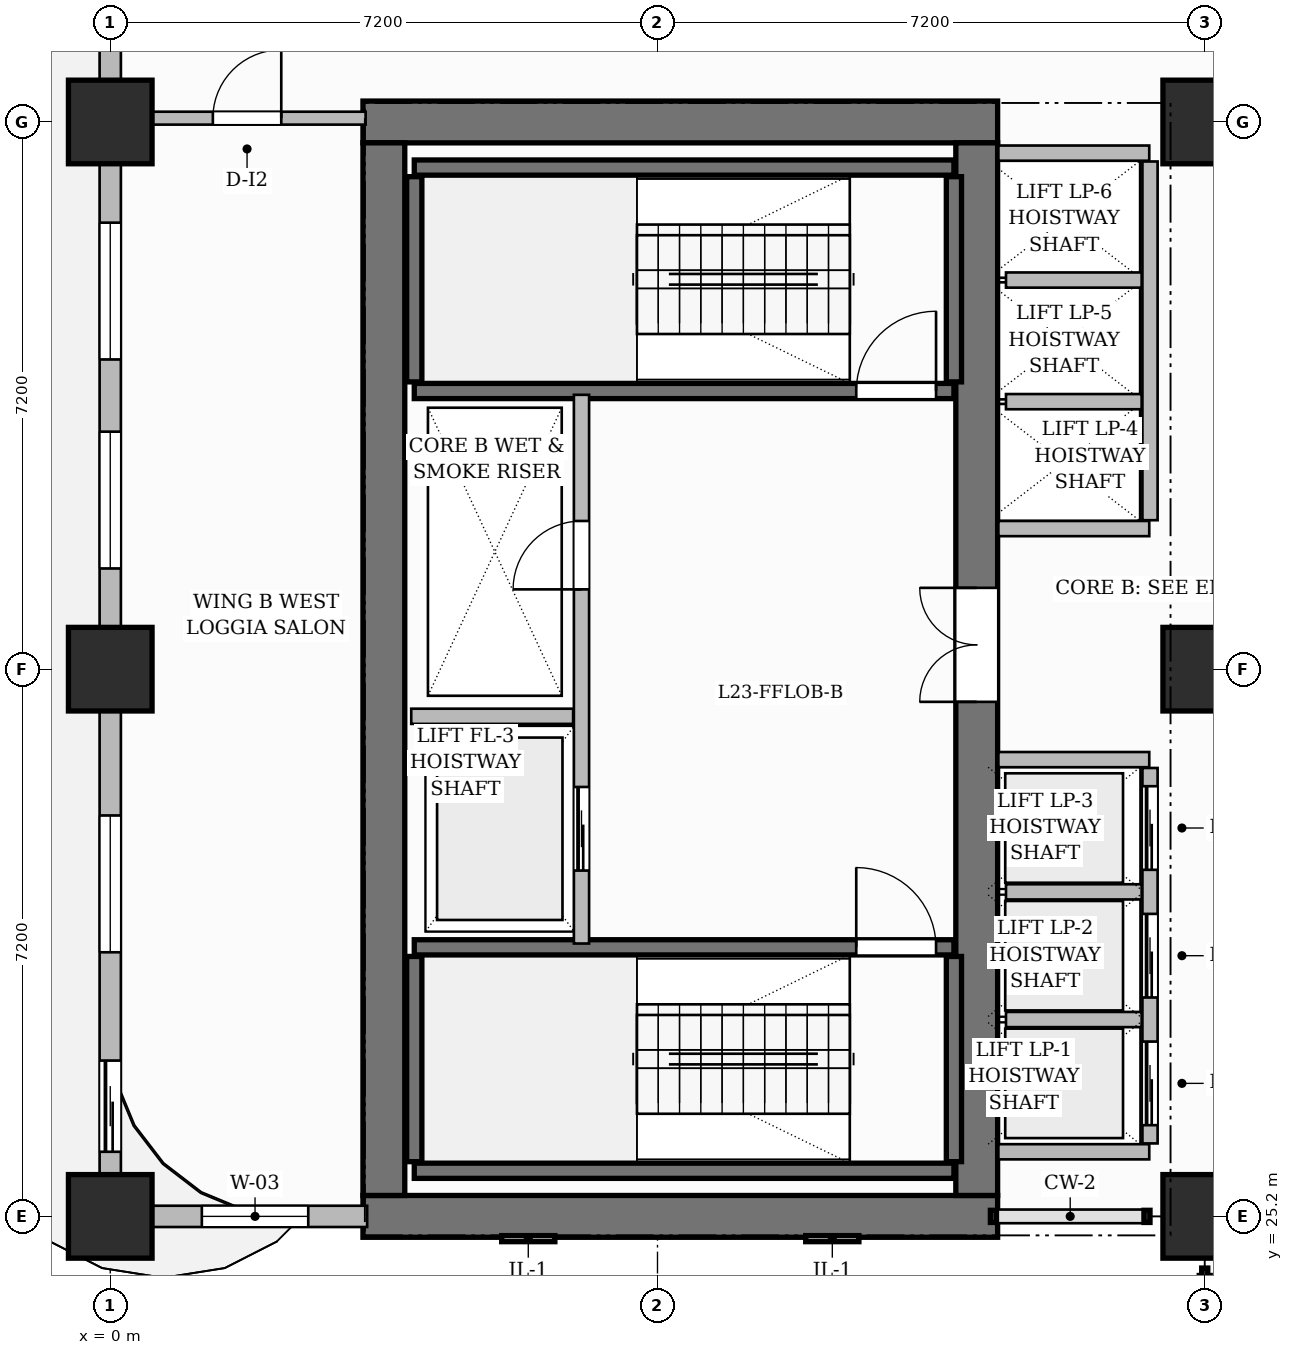
"""IFC4 building model, lengths in metres.
Left out: names, types, materials, properties, quantities, classifications, styles, units other than length and angle.
Written with IfcOpenShell. Run it as: python <this file> out.ifc"""

import sys

from ifc_helpers import new_model, si_unit, direction, frame, frame_2d, origin, origin_2d, place, context, subcontext, project, spatial, rectangle, extrude, source, transform, mapped, element, fill, save


model = new_model("IFC4")
c1 = context("Model", 3, precision=1e-05, world=origin(), true_north=direction((0.0, 1.0)))
c2 = subcontext(c1, "Body", "Model", "MODEL_VIEW")
j1 = project(units=[si_unit("LENGTHUNIT", "METRE"), si_unit("PLANEANGLEUNIT", "RADIAN")], contexts=[c1])
p1 = place(None, origin())
s1 = spatial("IfcSite", under=j1, at=p1, CompositionType="ELEMENT")
p2 = place(p1, origin())
s2 = spatial("IfcBuilding", under=s1, at=p2, CompositionType="ELEMENT")
p3 = place(p2, frame((0.0, 0.0, 95.3)))
s3 = spatial("IfcBuildingStorey", under=s2, at=p3, CompositionType="ELEMENT", Elevation=95.3)
for number, where, z_axis, x_axis in (
    (1, (3.325, 25.2, 0.0), (0.0, 0.0, 1.0), (1.0, 0.0, 0.0)),
    (2, (3.325, 39.6, 0.0), (0.0, 0.0, 1.0), (1.0, 0.0, 0.0)),
):
    element("IfcWall", number, at=place(p3, frame(where, z_axis=z_axis, x_axis=x_axis)), inside=s3, PredefinedType="SHEAR", context=c2, shape_type="SweptSolid", body=[
        extrude(rectangle(XDim=8.35, YDim=0.55, at=frame_2d((4.175, 0.0))), origin(), (0.0, 0.0, 1.0), 3.7),
    ])
p4 = place(p3, frame((3.6, 25.475, 0.0), z_axis=(0.0, 0.0, 1.0), x_axis=(0.0, 1.0, 0.0)))
e3 = element("IfcWall", 3, at=p4, inside=s3, PredefinedType="SHEAR", context=c2, shape_type="SweptSolid", body=[
    extrude(rectangle(XDim=13.85, YDim=0.55, at=frame_2d((6.925, 0.0))), origin(), (0.0, 0.0, 1.0), 3.7),
])
p5 = place(p3, frame((11.4, 25.475, 0.0), z_axis=(0.0, 0.0, 1.0), x_axis=(0.0, 1.0, 0.0)))
e4 = element("IfcWall", 4, at=p5, inside=s3, PredefinedType="SHEAR", context=c2, shape_type="SweptSolid", body=[
    extrude(rectangle(XDim=13.85, YDim=0.55, at=frame_2d((6.925, 0.0))), origin(), (0.0, 0.0, 1.0), 3.7),
])
p6 = place(p5, frame((6.495, 0.0, 0.0)))
e5 = element("IfcOpeningElement", 5, at=p6, cuts=e4, PredefinedType="OPENING", context=c2, shape_type="SweptSolid", body=[
    extrude(rectangle(XDim=1.5, YDim=2.2, at=frame_2d((0.75, 1.1))), frame((0.0, 0.285, 0.0), z_axis=(0.0, -1.0, 0.0), x_axis=(1.0, 0.0, 0.0)), (0.0, 0.0, 1.0), 0.57),
])
m1 = source(origin(), c2, "Body", "SweptSolid", [
    extrude(rectangle(XDim=1.1, YDim=1.1, at=origin_2d()), origin(), (0.0, 0.0, 1.0), 3.7),
])
for number, where, z_axis, x_axis in (
    (6, (0.0, 25.2, 0.0), (0.0, 0.0, 1.0), (1.0, 0.0, 0.0)),
    (7, (0.0, 32.4, 0.0), (0.0, 0.0, 1.0), (1.0, 0.0, 0.0)),
    (8, (0.0, 39.6, 0.0), (0.0, 0.0, 1.0), (1.0, 0.0, 0.0)),
    (9, (14.4, 25.2, 0.0), (0.0, 0.0, 1.0), (1.0, 0.0, 0.0)),
    (10, (14.4, 32.4, 0.0), (0.0, 0.0, 1.0), (1.0, 0.0, 0.0)),
    (11, (14.4, 39.6, 0.0), (0.0, 0.0, 1.0), (1.0, 0.0, 0.0)),
):
    element("IfcColumn", number, at=place(p3, frame(where, z_axis=z_axis, x_axis=x_axis)), inside=s3, PredefinedType="COLUMN", context=c2, shape_type="MappedRepresentation", body=[
        mapped(m1, transform((0.0, 0.0, 0.0), scale=1.0)),
    ])
p7 = place(p3, frame((4.0, 25.8, 0.0), z_axis=(0.0, 0.0, 1.0), x_axis=(1.0, 0.0, 0.0)))
e12 = element("IfcWall", 12, at=p7, inside=s3, PredefinedType="SHEAR", context=c2, shape_type="SweptSolid", body=[
    extrude(rectangle(XDim=7.1, YDim=0.2, at=frame_2d((3.55, 0.0))), origin(), (0.0, 0.0, 1.0), 3.7),
])
for number, where, z_axis, x_axis in (
    (13, (4.0, 25.92, 0.0), (0.0, 0.0, 1.0), (0.0, 1.0, 0.0)),
    (14, (11.1, 25.92, 0.0), (0.0, 0.0, 1.0), (0.0, 1.0, 0.0)),
):
    element("IfcWall", number, at=place(p3, frame(where, z_axis=z_axis, x_axis=x_axis)), inside=s3, PredefinedType="SHEAR", context=c2, shape_type="SweptSolid", body=[
        extrude(rectangle(XDim=2.7, YDim=0.2, at=frame_2d((1.35, 0.0))), origin(), (0.0, 0.0, 1.0), 3.7),
    ])
p8 = place(p3, frame((4.0, 28.74, 0.0), z_axis=(0.0, 0.0, 1.0), x_axis=(1.0, 0.0, 0.0)))
e15 = element("IfcWall", 15, at=p8, inside=s3, PredefinedType="SHEAR", context=c2, shape_type="SweptSolid", body=[
    extrude(rectangle(XDim=7.1, YDim=0.2, at=frame_2d((3.55, 0.0))), origin(), (0.0, 0.0, 1.0), 3.7),
])
p9 = place(p8, frame((5.815, 0.0, 0.0)))
e16 = element("IfcOpeningElement", 16, at=p9, cuts=e15, PredefinedType="OPENING", context=c2, shape_type="SweptSolid", body=[
    extrude(rectangle(XDim=1.05, YDim=2.2, at=frame_2d((0.525, 1.1))), frame((0.0, 0.11, 0.0), z_axis=(0.0, -1.0, 0.0), x_axis=(1.0, 0.0, 0.0)), (0.0, 0.0, 1.0), 0.22),
])
p10 = place(p3, frame((4.0, 39.0, 0.0), z_axis=(0.0, 0.0, 1.0), x_axis=(1.0, 0.0, 0.0)))
e17 = element("IfcWall", 17, at=p10, inside=s3, PredefinedType="SHEAR", context=c2, shape_type="SweptSolid", body=[
    extrude(rectangle(XDim=7.1, YDim=0.2, at=frame_2d((3.55, 0.0))), origin(), (0.0, 0.0, 1.0), 3.7),
])
for number, where, z_axis, x_axis in (
    (18, (4.0, 36.18, 0.0), (0.0, 0.0, 1.0), (0.0, 1.0, 0.0)),
    (19, (11.1, 36.18, 0.0), (0.0, 0.0, 1.0), (0.0, 1.0, 0.0)),
):
    element("IfcWall", number, at=place(p3, frame(where, z_axis=z_axis, x_axis=x_axis)), inside=s3, PredefinedType="SHEAR", context=c2, shape_type="SweptSolid", body=[
        extrude(rectangle(XDim=2.7, YDim=0.2, at=frame_2d((1.35, 0.0))), origin(), (0.0, 0.0, 1.0), 3.7),
    ])
p11 = place(p3, frame((4.0, 36.06, 0.0), z_axis=(0.0, 0.0, 1.0), x_axis=(1.0, 0.0, 0.0)))
e20 = element("IfcWall", 20, at=p11, inside=s3, PredefinedType="SHEAR", context=c2, shape_type="SweptSolid", body=[
    extrude(rectangle(XDim=7.1, YDim=0.2, at=frame_2d((3.55, 0.0))), origin(), (0.0, 0.0, 1.0), 3.7),
])
p12 = place(p11, frame((5.815, 0.0, 0.0)))
e21 = element("IfcOpeningElement", 21, at=p12, cuts=e20, PredefinedType="OPENING", context=c2, shape_type="SweptSolid", body=[
    extrude(rectangle(XDim=1.05, YDim=2.2, at=frame_2d((0.525, 1.1))), frame((0.0, 0.11, 0.0), z_axis=(0.0, -1.0, 0.0), x_axis=(1.0, 0.0, 0.0)), (0.0, 0.0, 1.0), 0.22),
])
p13 = place(p3, frame((6.2, 28.79, 0.0), z_axis=(0.0, 0.0, 1.0), x_axis=(0.0, 1.0, 0.0)))
e22 = element("IfcWall", 22, at=p13, inside=s3, PredefinedType="PARTITIONING", context=c2, shape_type="SweptSolid", body=[
    extrude(rectangle(XDim=7.22, YDim=0.2, at=frame_2d((3.61, 0.0))), origin(), (0.0, 0.0, 1.0), 3.45),
])
p14 = place(p13, frame((4.66, 0.0, 0.0)))
e23 = element("IfcOpeningElement", 23, at=p14, cuts=e22, PredefinedType="OPENING", context=c2, shape_type="SweptSolid", body=[
    extrude(rectangle(XDim=0.9, YDim=2.1, at=frame_2d((0.45, 1.05))), frame((0.0, 0.11, 0.0), z_axis=(0.0, -1.0, 0.0), x_axis=(1.0, 0.0, 0.0)), (0.0, 0.0, 1.0), 0.22),
])
p15 = place(p13, frame((0.96, 0.0, 0.0)))
e24 = element("IfcOpeningElement", 24, at=p15, cuts=e22, PredefinedType="OPENING", context=c2, shape_type="SweptSolid", body=[
    extrude(rectangle(XDim=1.1, YDim=2.2, at=frame_2d((0.55, 1.1))), frame((0.0, 0.11, 0.0), z_axis=(0.0, -1.0, 0.0), x_axis=(1.0, 0.0, 0.0)), (0.0, 0.0, 1.0), 0.22),
])
p16 = place(p3, frame((3.96, 31.78, 0.0), z_axis=(0.0, 0.0, 1.0), x_axis=(1.0, 0.0, 0.0)))
e25 = element("IfcWall", 25, at=p16, inside=s3, PredefinedType="PARTITIONING", context=c2, shape_type="SweptSolid", body=[
    extrude(rectangle(XDim=2.13, YDim=0.2, at=frame_2d((1.065, 0.0))), origin(), (0.0, 0.0, 1.0), 3.45),
])
for number, where, z_axis, x_axis in (
    (26, (11.685, 26.05, 0.0), (0.0, 0.0, 1.0), (1.0, 0.0, 0.0)),
    (27, (11.685, 31.21, 0.0), (0.0, 0.0, 1.0), (1.0, 0.0, 0.0)),
):
    element("IfcWall", number, at=place(p3, frame(where, z_axis=z_axis, x_axis=x_axis)), inside=s3, PredefinedType="PARTITIONING", context=c2, shape_type="SweptSolid", body=[
        extrude(rectangle(XDim=1.985, YDim=0.2, at=frame_2d((0.992, 0.0))), origin(), (0.0, 0.0, 1.0), 3.45),
    ])
p17 = place(p3, frame((13.68, 26.16, 0.0), z_axis=(0.0, 0.0, 1.0), x_axis=(0.0, 1.0, 0.0)))
e28 = element("IfcWall", 28, at=p17, inside=s3, PredefinedType="PARTITIONING", context=c2, shape_type="SweptSolid", body=[
    extrude(rectangle(XDim=4.94, YDim=0.2, at=frame_2d((2.47, 0.0))), origin(), (0.0, 0.0, 1.0), 3.45),
])
p18 = place(p17, frame((0.24, 0.0, 0.0)))
e29 = element("IfcOpeningElement", 29, at=p18, cuts=e28, PredefinedType="OPENING", context=c2, shape_type="SweptSolid", body=[
    extrude(rectangle(XDim=1.1, YDim=2.2, at=frame_2d((0.55, 1.1))), frame((0.0, 0.11, 0.0), z_axis=(0.0, -1.0, 0.0), x_axis=(1.0, 0.0, 0.0)), (0.0, 0.0, 1.0), 0.22),
])
p19 = place(p17, frame((1.92, 0.0, 0.0)))
e30 = element("IfcOpeningElement", 30, at=p19, cuts=e28, PredefinedType="OPENING", context=c2, shape_type="SweptSolid", body=[
    extrude(rectangle(XDim=1.1, YDim=2.2, at=frame_2d((0.55, 1.1))), frame((0.0, 0.11, 0.0), z_axis=(0.0, -1.0, 0.0), x_axis=(1.0, 0.0, 0.0)), (0.0, 0.0, 1.0), 0.22),
])
p20 = place(p17, frame((3.6, 0.0, 0.0)))
e31 = element("IfcOpeningElement", 31, at=p20, cuts=e28, PredefinedType="OPENING", context=c2, shape_type="SweptSolid", body=[
    extrude(rectangle(XDim=1.1, YDim=2.2, at=frame_2d((0.55, 1.1))), frame((0.0, 0.11, 0.0), z_axis=(0.0, -1.0, 0.0), x_axis=(1.0, 0.0, 0.0)), (0.0, 0.0, 1.0), 0.22),
])
for number, where, z_axis, x_axis in (
    (32, (11.785, 27.79, 0.0), (0.0, 0.0, 1.0), (1.0, 0.0, 0.0)),
    (33, (11.785, 29.47, 0.0), (0.0, 0.0, 1.0), (1.0, 0.0, 0.0)),
):
    element("IfcWall", number, at=place(p3, frame(where, z_axis=z_axis, x_axis=x_axis)), inside=s3, PredefinedType="PARTITIONING", context=c2, shape_type="SweptSolid", body=[
        extrude(rectangle(XDim=1.785, YDim=0.2, at=frame_2d((0.893, 0.0))), origin(), (0.0, 0.0, 1.0), 3.45),
    ])
for number, where, z_axis, x_axis in (
    (34, (11.685, 34.25, 0.0), (0.0, 0.0, 1.0), (1.0, 0.0, 0.0)),
    (35, (11.685, 39.19, 0.0), (0.0, 0.0, 1.0), (1.0, 0.0, 0.0)),
):
    element("IfcWall", number, at=place(p3, frame(where, z_axis=z_axis, x_axis=x_axis)), inside=s3, PredefinedType="PARTITIONING", context=c2, shape_type="SweptSolid", body=[
        extrude(rectangle(XDim=1.985, YDim=0.2, at=frame_2d((0.992, 0.0))), origin(), (0.0, 0.0, 1.0), 3.45),
    ])
p21 = place(p3, frame((13.68, 34.36, 0.0), z_axis=(0.0, 0.0, 1.0), x_axis=(0.0, 1.0, 0.0)))
e36 = element("IfcWall", 36, at=p21, inside=s3, PredefinedType="PARTITIONING", context=c2, shape_type="SweptSolid", body=[
    extrude(rectangle(XDim=4.72, YDim=0.2, at=frame_2d((2.36, 0.0))), origin(), (0.0, 0.0, 1.0), 3.45),
])
for number, where, z_axis, x_axis in (
    (37, (11.785, 35.92, 0.0), (0.0, 0.0, 1.0), (1.0, 0.0, 0.0)),
    (38, (11.785, 37.52, 0.0), (0.0, 0.0, 1.0), (1.0, 0.0, 0.0)),
):
    element("IfcWall", number, at=place(p3, frame(where, z_axis=z_axis, x_axis=x_axis)), inside=s3, PredefinedType="PARTITIONING", context=c2, shape_type="SweptSolid", body=[
        extrude(rectangle(XDim=1.785, YDim=0.2, at=frame_2d((0.893, 0.0))), origin(), (0.0, 0.0, 1.0), 3.45),
    ])
p22 = place(p3, frame((0.24, 39.65, 0.0), z_axis=(0.0, 0.0, 1.0), x_axis=(1.0, 0.0, 0.0)))
e39 = element("IfcWall", 39, at=p22, inside=s3, PredefinedType="PARTITIONING", context=c2, shape_type="SweptSolid", body=[
    extrude(rectangle(XDim=3.12, YDim=0.17, at=frame_2d((1.56, 0.0))), origin(), (0.0, 0.0, 1.0), 3.45),
])
p23 = place(p22, frame((1.11, 0.0, 0.0)))
e40 = element("IfcOpeningElement", 40, at=p23, cuts=e39, PredefinedType="OPENING", context=c2, shape_type="SweptSolid", body=[
    extrude(rectangle(XDim=0.9, YDim=2.15, at=frame_2d((0.45, 1.075))), frame((0.0, 0.095, 0.0), z_axis=(0.0, -1.0, 0.0), x_axis=(1.0, 0.0, 0.0)), (0.0, 0.0, 1.0), 0.19),
])
p24 = place(p3, frame((0.0, 25.2, 0.0), z_axis=(0.0, 0.0, 1.0), x_axis=(1.0, 0.0, 0.0)))
e41 = element("IfcWall", 41, at=p24, inside=s3, PredefinedType="SOLIDWALL", context=c2, shape_type="SweptSolid", body=[
    extrude(rectangle(XDim=3.38, YDim=0.28, at=frame_2d((1.69, 0.0))), origin(), (0.0, 0.0, 1.0), 3.45),
])
p25 = place(p24, frame((1.205, 0.0, 0.8)))
e42 = element("IfcOpeningElement", 42, at=p25, cuts=e41, PredefinedType="OPENING", context=c2, shape_type="SweptSolid", body=[
    extrude(rectangle(XDim=1.4, YDim=1.85, at=frame_2d((0.7, 0.925))), frame((0.0, 0.15, 0.0), z_axis=(0.0, -1.0, 0.0), x_axis=(1.0, 0.0, 0.0)), (0.0, 0.0, 1.0), 0.3),
])
p26 = place(p3, frame((0.0, 25.25, 0.0), z_axis=(0.0, 0.0, 1.0), x_axis=(0.0, 1.0, 0.0)))
e43 = element("IfcWall", 43, at=p26, inside=s3, PredefinedType="SOLIDWALL", context=c2, shape_type="SweptSolid", body=[
    extrude(rectangle(XDim=21.5, YDim=0.28, at=frame_2d((10.75, 0.0))), origin(), (0.0, 0.0, 1.0), 2.885),
])
p27 = place(p26, frame((18.45, 0.0, 0.0)))
e44 = element("IfcOpeningElement", 44, at=p27, cuts=e43, PredefinedType="OPENING", context=c2, shape_type="SweptSolid", body=[
    extrude(rectangle(XDim=1.2, YDim=2.2, at=frame_2d((0.6, 1.1))), frame((0.0, 0.15, 0.0), z_axis=(0.0, -1.0, 0.0), x_axis=(1.0, 0.0, 0.0)), (0.0, 0.0, 1.0), 0.3),
])
p28 = place(p26, frame((0.8, 0.0, 0.0)))
e45 = element("IfcOpeningElement", 45, at=p28, cuts=e43, PredefinedType="OPENING", context=c2, shape_type="SweptSolid", body=[
    extrude(rectangle(XDim=1.2, YDim=2.2, at=frame_2d((0.6, 1.1))), frame((0.0, 0.15, 0.0), z_axis=(0.0, -1.0, 0.0), x_axis=(1.0, 0.0, 0.0)), (0.0, 0.0, 1.0), 0.3),
])
p29 = place(p26, frame((3.425, 0.0, 0.8)))
e46 = element("IfcOpeningElement", 46, at=p29, cuts=e43, PredefinedType="OPENING", context=c2, shape_type="SweptSolid", body=[
    extrude(rectangle(XDim=1.8, YDim=1.85, at=frame_2d((0.9, 0.925))), frame((0.0, 0.15, 0.0), z_axis=(0.0, -1.0, 0.0), x_axis=(1.0, 0.0, 0.0)), (0.0, 0.0, 1.0), 0.3),
])
p30 = place(p26, frame((8.475, 0.0, 0.8)))
e47 = element("IfcOpeningElement", 47, at=p30, cuts=e43, PredefinedType="OPENING", context=c2, shape_type="SweptSolid", body=[
    extrude(rectangle(XDim=1.8, YDim=1.85, at=frame_2d((0.9, 0.925))), frame((0.0, 0.15, 0.0), z_axis=(0.0, -1.0, 0.0), x_axis=(1.0, 0.0, 0.0)), (0.0, 0.0, 1.0), 0.3),
])
p31 = place(p26, frame((11.225, 0.0, 0.8)))
e48 = element("IfcOpeningElement", 48, at=p31, cuts=e43, PredefinedType="OPENING", context=c2, shape_type="SweptSolid", body=[
    extrude(rectangle(XDim=1.8, YDim=1.85, at=frame_2d((0.9, 0.925))), frame((0.0, 0.15, 0.0), z_axis=(0.0, -1.0, 0.0), x_axis=(1.0, 0.0, 0.0)), (0.0, 0.0, 1.0), 0.3),
])
p32 = place(p26, frame((15.75, 0.0, 0.8)))
e49 = element("IfcOpeningElement", 49, at=p32, cuts=e43, PredefinedType="OPENING", context=c2, shape_type="SweptSolid", body=[
    extrude(rectangle(XDim=1.8, YDim=1.85, at=frame_2d((0.9, 0.925))), frame((0.0, 0.15, 0.0), z_axis=(0.0, -1.0, 0.0), x_axis=(1.0, 0.0, 0.0)), (0.0, 0.0, 1.0), 0.3),
])
m2 = source(origin(), c2, "Body", "SweptSolid", [
    extrude(rectangle(XDim=1.05, YDim=2.2, at=frame_2d((0.525, 1.1))), frame((0.0, 0.025, 0.0), z_axis=(0.0, -1.0, 0.0), x_axis=(1.0, 0.0, 0.0)), (0.0, 0.0, 1.0), 0.05),
])
p33 = place(p9, origin())
e50 = element("IfcDoor", 50, at=p33, inside=s3, OperationType="SINGLE_SWING_LEFT", PredefinedType="DOOR", context=c2, shape_type="MappedRepresentation", body=[
    mapped(m2, transform((0.0, 0.0, 0.0), scale=1.0)),
])
fill(e16, e50)
p34 = place(p12, origin())
e51 = element("IfcDoor", 51, at=p34, inside=s3, OperationType="SINGLE_SWING_RIGHT", PredefinedType="DOOR", context=c2, shape_type="MappedRepresentation", body=[
    mapped(m2, transform((0.0, 0.0, 0.0), scale=1.0)),
])
fill(e21, e51)
m3 = source(origin(), c2, "Body", "SweptSolid", [
    extrude(rectangle(XDim=0.9, YDim=2.1, at=frame_2d((0.45, 1.05))), frame((0.0, 0.025, 0.0), z_axis=(0.0, -1.0, 0.0), x_axis=(1.0, 0.0, 0.0)), (0.0, 0.0, 1.0), 0.05),
])
p35 = place(p14, origin())
e52 = element("IfcDoor", 52, at=p35, inside=s3, OperationType="SINGLE_SWING_LEFT", PredefinedType="DOOR", context=c2, shape_type="MappedRepresentation", body=[
    mapped(m3, transform((0.0, 0.0, 0.0), scale=1.0)),
])
fill(e23, e52)
m4 = source(origin(), c2, "Body", "SweptSolid", [
    extrude(rectangle(XDim=1.5, YDim=2.2, at=frame_2d((0.75, 1.1))), frame((0.0, 0.025, 0.0), z_axis=(0.0, -1.0, 0.0), x_axis=(1.0, 0.0, 0.0)), (0.0, 0.0, 1.0), 0.05),
])
p36 = place(p6, origin())
e53 = element("IfcDoor", 53, at=p36, inside=s3, OperationType="DOUBLE_DOOR_SINGLE_SWING", PredefinedType="DOOR", context=c2, shape_type="MappedRepresentation", body=[
    mapped(m4, transform((0.0, 0.0, 0.0), scale=1.0)),
])
fill(e5, e53)
m5 = source(origin(), c2, "Body", "SweptSolid", [
    extrude(rectangle(XDim=0.9, YDim=2.15, at=frame_2d((0.45, 1.075))), frame((0.0, 0.025, 0.0), z_axis=(0.0, -1.0, 0.0), x_axis=(1.0, 0.0, 0.0)), (0.0, 0.0, 1.0), 0.05),
])
p37 = place(p23, origin())
e54 = element("IfcDoor", 54, at=p37, inside=s3, OperationType="SINGLE_SWING_RIGHT", PredefinedType="DOOR", context=c2, shape_type="MappedRepresentation", body=[
    mapped(m5, transform((0.0, 0.0, 0.0), scale=1.0)),
])
fill(e40, e54)
m6 = source(origin(), c2, "Body", "SweptSolid", [
    extrude(rectangle(XDim=1.1, YDim=2.2, at=frame_2d((0.55, 1.1))), frame((0.0, 0.025, 0.0), z_axis=(0.0, -1.0, 0.0), x_axis=(1.0, 0.0, 0.0)), (0.0, 0.0, 1.0), 0.05),
])
p38 = place(p15, origin())
e55 = element("IfcDoor", 55, at=p38, inside=s3, OperationType="SLIDING_TO_LEFT", PredefinedType="DOOR", context=c2, shape_type="MappedRepresentation", body=[
    mapped(m6, transform((0.0, 0.0, 0.0), scale=1.0)),
])
fill(e24, e55)
p39 = place(p18, origin())
e56 = element("IfcDoor", 56, at=p39, inside=s3, OperationType="SLIDING_TO_LEFT", PredefinedType="DOOR", context=c2, shape_type="MappedRepresentation", body=[
    mapped(m6, transform((0.0, 0.0, 0.0), scale=1.0)),
])
fill(e29, e56)
p40 = place(p19, origin())
e57 = element("IfcDoor", 57, at=p40, inside=s3, OperationType="SLIDING_TO_LEFT", PredefinedType="DOOR", context=c2, shape_type="MappedRepresentation", body=[
    mapped(m6, transform((0.0, 0.0, 0.0), scale=1.0)),
])
fill(e30, e57)
p41 = place(p20, origin())
e58 = element("IfcDoor", 58, at=p41, inside=s3, OperationType="SLIDING_TO_LEFT", PredefinedType="DOOR", context=c2, shape_type="MappedRepresentation", body=[
    mapped(m6, transform((0.0, 0.0, 0.0), scale=1.0)),
])
fill(e31, e58)
m7 = source(origin(), c2, "Body", "SweptSolid", [
    extrude(rectangle(XDim=1.2, YDim=2.2, at=frame_2d((0.6, 1.1))), frame((0.0, 0.025, 0.0), z_axis=(0.0, -1.0, 0.0), x_axis=(1.0, 0.0, 0.0)), (0.0, 0.0, 1.0), 0.05),
])
p42 = place(p28, origin())
e59 = element("IfcDoor", 59, at=p42, inside=s3, OperationType="SLIDING_TO_LEFT", PredefinedType="DOOR", context=c2, shape_type="MappedRepresentation", body=[
    mapped(m7, transform((0.0, 0.0, 0.0), scale=1.0)),
])
fill(e45, e59)
m8 = source(origin(), c2, "Body", "SweptSolid", [
    extrude(rectangle(XDim=1.4, YDim=1.85, at=frame_2d((0.7, 0.925))), frame((0.0, 0.03, 0.0), z_axis=(0.0, -1.0, 0.0), x_axis=(1.0, 0.0, 0.0)), (0.0, 0.0, 1.0), 0.06),
])
p43 = place(p25, origin())
e60 = element("IfcWindow", 60, at=p43, inside=s3, PartitioningType="SINGLE_PANEL", PredefinedType="WINDOW", context=c2, shape_type="MappedRepresentation", body=[
    mapped(m8, transform((0.0, 0.0, 0.0), scale=1.0)),
])
fill(e42, e60)
m9 = source(origin(), c2, "Body", "SweptSolid", [
    extrude(rectangle(XDim=1.8, YDim=1.85, at=frame_2d((0.9, 0.925))), frame((0.0, 0.03, 0.0), z_axis=(0.0, -1.0, 0.0), x_axis=(1.0, 0.0, 0.0)), (0.0, 0.0, 1.0), 0.06),
])
p44 = place(p29, origin())
e61 = element("IfcWindow", 61, at=p44, inside=s3, PartitioningType="DOUBLE_PANEL_VERTICAL", PredefinedType="WINDOW", context=c2, shape_type="MappedRepresentation", body=[
    mapped(m9, transform((0.0, 0.0, 0.0), scale=1.0)),
])
fill(e46, e61)
p45 = place(p30, origin())
e62 = element("IfcWindow", 62, at=p45, inside=s3, PartitioningType="DOUBLE_PANEL_VERTICAL", PredefinedType="WINDOW", context=c2, shape_type="MappedRepresentation", body=[
    mapped(m9, transform((0.0, 0.0, 0.0), scale=1.0)),
])
fill(e47, e62)
p46 = place(p31, origin())
e63 = element("IfcWindow", 63, at=p46, inside=s3, PartitioningType="DOUBLE_PANEL_VERTICAL", PredefinedType="WINDOW", context=c2, shape_type="MappedRepresentation", body=[
    mapped(m9, transform((0.0, 0.0, 0.0), scale=1.0)),
])
fill(e48, e63)
save(model, sys.argv[1])
